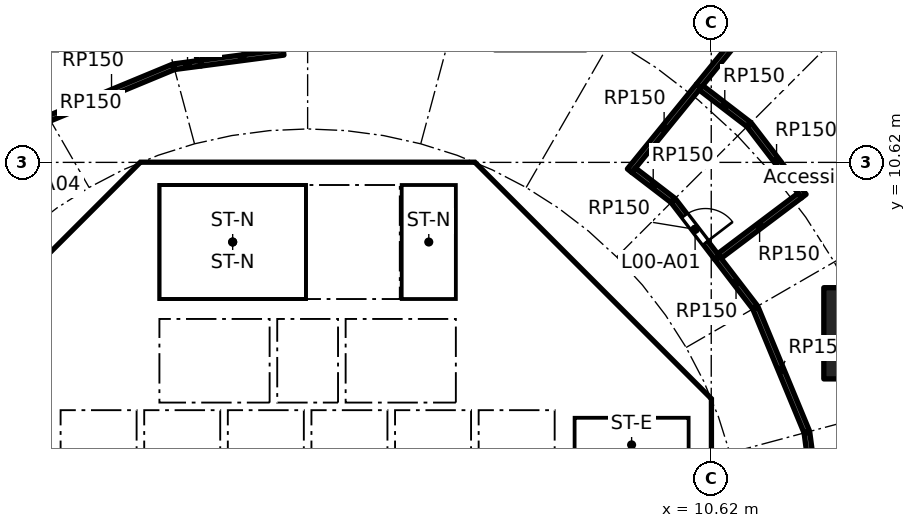
"""IFC4 building model, lengths in metres.
Left out: names, types, materials, properties, quantities, classifications, styles, units other than length and angle.
Written with IfcOpenShell. Run it as: python <this file> out.ifc"""

import sys

from ifc_helpers import new_model, si_unit, direction, frame, frame_2d, origin, origin_2d, place, context, subcontext, project, spatial, polyline, rectangle, outline, extrude, element, fill, save


model = new_model("IFC4")
c1 = context("Model", 3, precision=1e-05, world=origin(), true_north=direction((0.0, 1.0)))
c2 = subcontext(c1, "Body", "Model", "MODEL_VIEW")
j1 = project(units=[si_unit("LENGTHUNIT", "METRE"), si_unit("PLANEANGLEUNIT", "RADIAN")], contexts=[c1])
p1 = place(None, origin())
s1 = spatial("IfcSite", under=j1, at=p1, CompositionType="ELEMENT")
p2 = place(p1, origin())
s2 = spatial("IfcBuilding", under=s1, at=p2, CompositionType="ELEMENT")
p3 = place(p2, origin())
s3 = spatial("IfcBuildingStorey", under=s2, at=p3, CompositionType="ELEMENT", Elevation=0.0)
p4 = place(p3, frame((14.782, 6.123, 0.0), z_axis=(0.0, 0.0, 1.0), x_axis=(1.0, 0.0, 0.0)))
e1 = element("IfcColumn", 1, at=p4, inside=s3, PredefinedType="COLUMN", context=c2, shape_type="SweptSolid", body=[
    extrude(rectangle(XDim=2.4, YDim=2.4, at=origin_2d()), origin(), (0.0, 0.0, 1.0), 7.0),
])
p5 = place(p3, frame((10.325, -3.801, 0.0), z_axis=(0.0, 0.0, 1.0), x_axis=(0.0, 1.0, 0.0)))
e2 = element("IfcWall", 2, at=p5, inside=s3, PredefinedType="SHEAR", context=c2, shape_type="SweptSolid", body=[
    extrude(rectangle(XDim=7.602, YDim=0.6, at=frame_2d((3.801, 0.0))), origin(), (0.0, 0.0, 1.0), 6.7),
])
p6 = place(p5, frame((6.351, 0.0, 0.0)))
e3 = element("IfcOpeningElement", 3, at=p6, cuts=e2, PredefinedType="OPENING", context=c2, shape_type="SweptSolid", body=[
    extrude(rectangle(XDim=1.1, YDim=2.1, at=frame_2d((0.55, 1.05))), frame((0.0, 0.31, 0.0), z_axis=(0.0, -1.0, 0.0), x_axis=(1.0, 0.0, 0.0)), (0.0, 0.0, 1.0), 0.62),
])
p7 = place(p3, frame((9.988, 4.613, 0.0), z_axis=(0.0, 0.0, 1.0), x_axis=(-0.707106781187, 0.707106781187, 0.0)))
e4 = element("IfcWall", 4, at=p7, inside=s3, PredefinedType="SHEAR", context=c2, shape_type="SweptSolid", body=[
    extrude(rectangle(XDim=7.602, YDim=0.6, at=frame_2d((3.801, 0.0))), origin(), (0.0, 0.0, 1.0), 6.7),
])
p8 = place(p7, frame((3.201, 0.0, 0.0)))
e5 = element("IfcOpeningElement", 5, at=p8, cuts=e4, PredefinedType="OPENING", context=c2, shape_type="SweptSolid", body=[
    extrude(rectangle(XDim=1.2, YDim=2.1, at=frame_2d((0.6, 1.05))), frame((0.0, 0.31, 0.0), z_axis=(0.0, -1.0, 0.0), x_axis=(1.0, 0.0, 0.0)), (0.0, 0.0, 1.0), 0.62),
])
p9 = place(p3, frame((3.801, 10.325, 0.0), z_axis=(0.0, 0.0, 1.0), x_axis=(-1.0, 0.0, 0.0)))
e6 = element("IfcWall", 6, at=p9, inside=s3, PredefinedType="SHEAR", context=c2, shape_type="SweptSolid", body=[
    extrude(rectangle(XDim=7.602, YDim=0.6, at=frame_2d((3.801, 0.0))), origin(), (0.0, 0.0, 1.0), 6.7),
])
p10 = place(p9, frame((0.151, 0.0, 0.0)))
e7 = element("IfcOpeningElement", 7, at=p10, cuts=e6, PredefinedType="OPENING", context=c2, shape_type="SweptSolid", body=[
    extrude(rectangle(XDim=1.1, YDim=2.1, at=frame_2d((0.55, 1.05))), frame((0.0, 0.31, 0.0), z_axis=(0.0, -1.0, 0.0), x_axis=(1.0, 0.0, 0.0)), (0.0, 0.0, 1.0), 0.62),
])
p11 = place(p3, frame((-4.613, 9.988, 0.0), z_axis=(0.0, 0.0, 1.0), x_axis=(-0.707106781187, -0.707106781187, 0.0)))
e8 = element("IfcWall", 8, at=p11, inside=s3, PredefinedType="SHEAR", context=c2, shape_type="SweptSolid", body=[
    extrude(rectangle(XDim=7.602, YDim=0.6, at=frame_2d((3.801, 0.0))), origin(), (0.0, 0.0, 1.0), 6.7),
])
p12 = place(p11, frame((0.351, 0.0, 0.0)))
e9 = element("IfcOpeningElement", 9, at=p12, cuts=e8, PredefinedType="OPENING", context=c2, shape_type="SweptSolid", body=[
    extrude(rectangle(XDim=1.1, YDim=2.1, at=frame_2d((0.55, 1.05))), frame((0.0, 0.31, 0.0), z_axis=(0.0, -1.0, 0.0), x_axis=(1.0, 0.0, 0.0)), (0.0, 0.0, 1.0), 0.62),
])
p13 = place(p3, frame((-5.8, 4.3, 0.0), z_axis=(0.0, 0.0, 1.0), x_axis=(0.0, 1.0, 0.0)))
e10 = element("IfcWall", 10, at=p13, inside=s3, PredefinedType="PARTITIONING", context=c2, shape_type="SweptSolid", body=[
    extrude(rectangle(XDim=3.927, YDim=0.15, at=frame_2d((1.963, 0.0))), origin(), (0.0, 0.0, 1.0), 6.7),
])
p14 = place(p13, frame((1.551, 0.0, 0.0)))
e11 = element("IfcOpeningElement", 11, at=p14, cuts=e10, PredefinedType="OPENING", context=c2, shape_type="SweptSolid", body=[
    extrude(rectangle(XDim=0.9, YDim=2.1, at=frame_2d((0.45, 1.05))), frame((0.0, 0.085, 0.0), z_axis=(0.0, -1.0, 0.0), x_axis=(1.0, 0.0, 0.0)), (0.0, 0.0, 1.0), 0.17),
])
p15 = place(p3, frame((4.0, 4.3, 0.0), z_axis=(0.0, 0.0, 1.0), x_axis=(0.0, 1.0, 0.0)))
e12 = element("IfcWall", 12, at=p15, inside=s3, PredefinedType="SOLIDWALL", context=c2, shape_type="SweptSolid", body=[
    extrude(rectangle(XDim=2.2, YDim=0.2, at=frame_2d((1.1, 0.0))), origin(), (0.0, 0.0, 1.0), 6.7),
])
p16 = place(p15, frame((0.55, 0.0, 0.0)))
e13 = element("IfcOpeningElement", 13, at=p16, cuts=e12, PredefinedType="OPENING", context=c2, shape_type="SweptSolid", body=[
    extrude(rectangle(XDim=1.1, YDim=2.1, at=frame_2d((0.55, 1.05))), frame((0.0, 0.11, 0.0), z_axis=(0.0, -1.0, 0.0), x_axis=(1.0, 0.0, 0.0)), (0.0, 0.0, 1.0), 0.22),
])
p17 = place(p3, frame((-4.0, 4.3, 0.0), z_axis=(0.0, 0.0, 1.0), x_axis=(0.0, 1.0, 0.0)))
e14 = element("IfcWall", 14, at=p17, inside=s3, PredefinedType="SOLIDWALL", context=c2, shape_type="SweptSolid", body=[
    extrude(rectangle(XDim=2.2, YDim=0.2, at=frame_2d((1.1, 0.0))), origin(), (0.0, 0.0, 1.0), 6.7),
])
p18 = place(p17, frame((0.55, 0.0, 0.0)))
e15 = element("IfcOpeningElement", 15, at=p18, cuts=e14, PredefinedType="OPENING", context=c2, shape_type="SweptSolid", body=[
    extrude(rectangle(XDim=1.1, YDim=2.1, at=frame_2d((0.55, 1.05))), frame((0.0, 0.11, 0.0), z_axis=(0.0, -1.0, 0.0), x_axis=(1.0, 0.0, 0.0)), (0.0, 0.0, 1.0), 0.22),
])
p19 = place(p3, frame((6.7, 4.0, 0.0), z_axis=(0.0, 0.0, 1.0), x_axis=(1.0, 0.0, 0.0)))
e16 = element("IfcWall", 16, at=p19, inside=s3, PredefinedType="SOLIDWALL", context=c2, shape_type="SweptSolid", body=[
    extrude(rectangle(XDim=3.325, YDim=0.2, at=frame_2d((1.662, 0.0))), origin(), (0.0, 0.0, 1.0), 6.7),
])
p20 = place(p19, frame((1.25, 0.0, 0.0)))
e17 = element("IfcOpeningElement", 17, at=p20, cuts=e16, PredefinedType="OPENING", context=c2, shape_type="SweptSolid", body=[
    extrude(rectangle(XDim=1.1, YDim=2.1, at=frame_2d((0.55, 1.05))), frame((0.0, 0.11, 0.0), z_axis=(0.0, -1.0, 0.0), x_axis=(1.0, 0.0, 0.0)), (0.0, 0.0, 1.0), 0.22),
])
p21 = place(p3, frame((4.0, 7.025, 0.0), z_axis=(0.0, 0.0, 1.0), x_axis=(0.0, 1.0, 0.0)))
e18 = element("IfcWall", 18, at=p21, inside=s3, PredefinedType="SOLIDWALL", context=c2, shape_type="SweptSolid", body=[
    extrude(rectangle(XDim=3.0, YDim=0.2, at=frame_2d((1.5, 0.0))), origin(), (0.0, 0.0, 1.0), 6.7),
])
p22 = place(p21, frame((0.925, 0.0, 0.0)))
e19 = element("IfcOpeningElement", 19, at=p22, cuts=e18, PredefinedType="OPENING", context=c2, shape_type="SweptSolid", body=[
    extrude(rectangle(XDim=1.1, YDim=2.1, at=frame_2d((0.55, 1.05))), frame((0.0, 0.11, 0.0), z_axis=(0.0, -1.0, 0.0), x_axis=(1.0, 0.0, 0.0)), (0.0, 0.0, 1.0), 0.22),
])
p23 = place(p3, origin())
e20 = element("IfcWall", 20, at=p23, inside=s3, PredefinedType="SHEAR", context=c2, shape_type="SweptSolid", body=[
    extrude(outline(polyline([(-3.801, 10.625), (-3.801, 10.025), (-4.152, 10.025), (-4.401, 9.776), (-4.825, 10.2), (-4.401, 10.625), (-3.801, 10.625)])), origin(), (0.0, 0.0, 1.0), 6.7),
])
p24 = place(p3, origin())
e21 = element("IfcWall", 21, at=p24, inside=s3, PredefinedType="SHEAR", context=c2, shape_type="SweptSolid", body=[
    extrude(outline(polyline([(4.825, 10.2), (4.401, 9.776), (4.152, 10.025), (3.801, 10.025), (3.801, 10.625), (4.401, 10.625), (4.825, 10.2)])), origin(), (0.0, 0.0, 1.0), 6.7),
])
p25 = place(p3, origin())
e22 = element("IfcWall", 22, at=p25, inside=s3, PredefinedType="SHEAR", context=c2, shape_type="SweptSolid", body=[
    extrude(outline(polyline([(10.625, 3.801), (10.025, 3.801), (10.025, 4.152), (9.776, 4.401), (10.2, 4.825), (10.625, 4.401), (10.625, 3.801)])), origin(), (0.0, 0.0, 1.0), 6.7),
])
for number, where, z_axis, x_axis in (
    (23, (-0.9, 4.3, 0.0), (0.0, 0.0, 1.0), (0.0, 1.0, 0.0)),
    (24, (0.9, 4.3, 0.0), (0.0, 0.0, 1.0), (0.0, 1.0, 0.0)),
):
    element("IfcWall", number, at=place(p3, frame(where, z_axis=z_axis, x_axis=x_axis)), inside=s3, PredefinedType="SOLIDWALL", context=c2, shape_type="SweptSolid", body=[
        extrude(rectangle(XDim=2.2, YDim=0.2, at=frame_2d((1.1, 0.0))), origin(), (0.0, 0.0, 1.0), 6.7),
    ])
p26 = place(p3, origin())
e25 = element("IfcWall", 25, at=p26, inside=s3, PredefinedType="SOLIDWALL", context=c2, shape_type="SweptSolid", body=[
    extrude(outline(polyline([(-6.5, 2.1), (-6.7, 2.1), (-6.7, 4.3), (6.7, 4.3), (6.7, 2.1), (6.5, 2.1), (6.5, 4.1), (4.5, 4.1), (4.5, 2.1), (4.3, 2.1), (4.3, 4.1), (2.3, 4.1), (2.3, 2.1), (2.1, 2.1), (2.1, 4.1), (0.1, 4.1), (0.1, 2.1), (-0.1, 2.1), (-0.1, 4.1), (-2.1, 4.1), (-2.1, 2.1), (-2.3, 2.1), (-2.3, 4.1), (-4.3, 4.1), (-4.3, 2.1), (-4.5, 2.1), (-4.5, 4.1), (-6.5, 4.1), (-6.5, 2.1)])), origin(), (0.0, 0.0, 1.0), 6.7),
])
p27 = place(p3, frame((-10.025, 4.0, 0.0), z_axis=(0.0, 0.0, 1.0), x_axis=(1.0, 0.0, 0.0)))
e26 = element("IfcWall", 26, at=p27, inside=s3, PredefinedType="PARTITIONING", context=c2, shape_type="SweptSolid", body=[
    extrude(rectangle(XDim=3.325, YDim=0.2, at=frame_2d((1.662, 0.0))), origin(), (0.0, 0.0, 1.0), 6.7),
])
p28 = place(p3, origin())
e27 = element("IfcWall", 27, at=p28, inside=s3, PredefinedType="SOLIDWALL", context=c2, shape_type="SweptSolid", body=[
    extrude(outline(polyline([(-3.9, 7.025), (-4.1, 7.025), (-4.1, 10.025), (-3.9, 10.025), (-3.9, 7.025)])), origin(), (0.0, 0.0, 1.0), 6.7),
])
p29 = place(p3, origin())
e28 = element("IfcWall", 28, at=p29, inside=s3, PredefinedType="SOLIDWALL", context=c2, shape_type="SweptSolid", body=[
    extrude(outline(polyline([(4.1, 6.5), (-4.1, 6.5), (-4.1, 7.025), (4.1, 7.025), (4.1, 6.5)])), origin(), (0.0, 0.0, 1.0), 6.7),
])
p30 = place(p3, origin())
e29 = element("IfcWall", 29, at=p30, inside=s3, PredefinedType="SOLIDWALL", context=c2, shape_type="SweptSolid", body=[
    extrude(outline(polyline([(7.025, -3.9), (6.7, -3.9), (6.7, 3.9), (7.025, 3.9), (7.025, -3.9)])), origin(), (0.0, 0.0, 1.0), 6.7),
])
p31 = place(p3, frame((-6.789, 11.782, 0.0), z_axis=(0.0, 0.0, 1.0), x_axis=(0.923881838111, 0.382677866108, 0.0)))
e30 = element("IfcWall", 30, at=p31, inside=s3, PredefinedType="PARTITIONING", context=c2, shape_type="SweptSolid", body=[
    extrude(rectangle(XDim=3.527, YDim=0.15, at=frame_2d((1.763, 0.0))), origin(), (0.0, 0.0, 1.0), 6.7),
])
p32 = place(p3, frame((-3.508, 13.138, 0.0), z_axis=(0.0, 0.0, 1.0), x_axis=(0.991460212813, 0.130409533429, 0.0)))
e31 = element("IfcWall", 31, at=p32, inside=s3, PredefinedType="PARTITIONING", context=c2, shape_type="SweptSolid", body=[
    extrude(rectangle(XDim=0.702, YDim=0.15, at=frame_2d((0.351, 0.0))), origin(), (0.0, 0.0, 1.0), 6.7),
])
p33 = place(p3, frame((-2.828, 13.303, 0.0), z_axis=(0.0, 0.0, 1.0), x_axis=(-0.207924325278, 0.978144915111, 0.0)))
e32 = element("IfcWall", 32, at=p33, inside=s3, PredefinedType="PARTITIONING", context=c2, shape_type="SweptSolid", body=[
    extrude(rectangle(XDim=16.699, YDim=0.15, at=frame_2d((8.35, 0.0))), origin(), (0.0, 0.0, 1.0), 6.7),
])
p34 = place(p3, frame((-2.812, 13.23, 0.0), z_axis=(0.0, 0.0, 1.0), x_axis=(0.991442947496, 0.130540728744, 0.0)))
e33 = element("IfcWall", 33, at=p34, inside=s3, PredefinedType="PARTITIONING", context=c2, shape_type="SweptSolid", body=[
    extrude(rectangle(XDim=2.198, YDim=0.15, at=frame_2d((1.099, 0.0))), origin(), (0.0, 0.0, 1.0), 6.7),
])
p35 = place(p3, frame((8.472, 10.401, 0.0), z_axis=(0.0, 0.0, 1.0), x_axis=(0.631544460315, 0.775339664048, 0.0)))
e34 = element("IfcWall", 34, at=p35, inside=s3, PredefinedType="PARTITIONING", context=c2, shape_type="SweptSolid", body=[
    extrude(rectangle(XDim=2.876, YDim=0.15, at=frame_2d((1.438, 0.0))), origin(), (0.0, 0.0, 1.0), 6.7),
])
p36 = place(p3, frame((9.607, 9.624, 0.0), z_axis=(0.0, 0.0, 1.0), x_axis=(-0.793421424222, 0.608672690028, 0.0)))
e35 = element("IfcWall", 35, at=p36, inside=s3, PredefinedType="PARTITIONING", context=c2, shape_type="SweptSolid", body=[
    extrude(rectangle(XDim=1.296, YDim=0.15, at=frame_2d((0.648, 0.0))), origin(), (0.0, 0.0, 1.0), 6.7),
])
p37 = place(p3, frame((10.348, 12.585, 0.0), z_axis=(0.0, 0.0, 1.0), x_axis=(0.793328373205, -0.608793965368, 0.0)))
e36 = element("IfcWall", 36, at=p37, inside=s3, PredefinedType="PARTITIONING", context=c2, shape_type="SweptSolid", body=[
    extrude(rectangle(XDim=1.584, YDim=0.15, at=frame_2d((0.792, 0.0))), origin(), (0.0, 0.0, 1.0), 6.7),
])
p38 = place(p3, frame((10.288, 12.631, 0.0), z_axis=(0.0, 0.0, 1.0), x_axis=(0.631545274273, 0.775339001046, 0.0)))
e37 = element("IfcWall", 37, at=p38, inside=s3, PredefinedType="PARTITIONING", context=c2, shape_type="SweptSolid", body=[
    extrude(rectangle(XDim=16.345, YDim=0.15, at=frame_2d((8.173, 0.0))), origin(), (0.0, 0.0, 1.0), 6.7),
])
p39 = place(p3, frame((10.774, 8.109, 0.0), z_axis=(0.0, 0.0, 1.0), x_axis=(-0.608754453805, 0.793358692504, 0.0)))
e38 = element("IfcWall", 38, at=p39, inside=s3, PredefinedType="PARTITIONING", context=c2, shape_type="SweptSolid", body=[
    extrude(rectangle(XDim=1.888, YDim=0.15, at=frame_2d((0.944, 0.0))), origin(), (0.0, 0.0, 1.0), 6.7),
])
p40 = place(p39, frame((0.5, 0.0, 0.0)))
e39 = element("IfcOpeningElement", 39, at=p40, cuts=e38, PredefinedType="OPENING", context=c2, shape_type="SweptSolid", body=[
    extrude(rectangle(XDim=0.9, YDim=2.1, at=frame_2d((0.45, 1.05))), frame((0.0, 0.085, 0.0), z_axis=(0.0, -1.0, 0.0), x_axis=(1.0, 0.0, 0.0)), (0.0, 0.0, 1.0), 0.17),
])
p41 = place(p3, frame((11.621, 11.604, 0.0), z_axis=(0.0, 0.0, 1.0), x_axis=(0.608759688573, -0.793354675771, 0.0)))
e40 = element("IfcWall", 40, at=p41, inside=s3, PredefinedType="PARTITIONING", context=c2, shape_type="SweptSolid", body=[
    extrude(rectangle(XDim=2.358, YDim=0.15, at=frame_2d((1.179, 0.0))), origin(), (0.0, 0.0, 1.0), 6.7),
])
p42 = place(p3, frame((11.771, 6.809, 0.0), z_axis=(0.0, 0.0, 1.0), x_axis=(-0.608716251771, 0.793388003961, 0.0)))
e41 = element("IfcWall", 41, at=p42, inside=s3, PredefinedType="PARTITIONING", context=c2, shape_type="SweptSolid", body=[
    extrude(rectangle(XDim=1.638, YDim=0.15, at=frame_2d((0.819, 0.0))), origin(), (0.0, 0.0, 1.0), 6.7),
])
p43 = place(p3, frame((12.951, 9.748, 0.0), z_axis=(0.0, 0.0, 1.0), x_axis=(-0.798970748419, -0.601369888813, 0.0)))
e42 = element("IfcWall", 42, at=p43, inside=s3, PredefinedType="PARTITIONING", context=c2, shape_type="SweptSolid", body=[
    extrude(rectangle(XDim=2.65, YDim=0.15, at=frame_2d((1.325, 0.0))), origin(), (0.0, 0.0, 1.0), 6.7),
])
p44 = place(p3, frame((13.132, 3.531, 0.0), z_axis=(0.0, 0.0, 1.0), x_axis=(-0.382677866108, 0.923881838111, 0.0)))
e43 = element("IfcWall", 43, at=p44, inside=s3, PredefinedType="PARTITIONING", context=c2, shape_type="SweptSolid", body=[
    extrude(rectangle(XDim=3.527, YDim=0.15, at=frame_2d((1.763, 0.0))), origin(), (0.0, 0.0, 1.0), 6.7),
])
p45 = place(p3, frame((13.376, 1.7, 0.0), z_axis=(0.0, 0.0, 1.0), x_axis=(-0.130506449818, 0.99144746031, 0.0)))
e44 = element("IfcWall", 44, at=p45, inside=s3, PredefinedType="PARTITIONING", context=c2, shape_type="SweptSolid", body=[
    extrude(rectangle(XDim=1.824, YDim=0.15, at=frame_2d((0.912, 0.0))), origin(), (0.0, 0.0, 1.0), 6.7),
])
p46 = place(p3, frame((31.284, 4.152, 0.0), z_axis=(0.0, 0.0, 1.0), x_axis=(-0.991305556345, -0.131579990725, 0.0)))
e45 = element("IfcWall", 45, at=p46, inside=s3, PredefinedType="PARTITIONING", context=c2, shape_type="SweptSolid", body=[
    extrude(rectangle(XDim=18.0, YDim=0.15, at=frame_2d((9.0, 0.0))), origin(), (0.0, 0.0, 1.0), 6.7),
])
p47 = place(p46, frame((8.625, 0.0, 0.0)))
e46 = element("IfcOpeningElement", 46, at=p47, cuts=e45, PredefinedType="OPENING", context=c2, shape_type="SweptSolid", body=[
    extrude(rectangle(XDim=0.9, YDim=2.1, at=frame_2d((0.45, 1.05))), frame((0.0, 0.085, 0.0), z_axis=(0.0, -1.0, 0.0), x_axis=(1.0, 0.0, 0.0)), (0.0, 0.0, 1.0), 0.17),
])
p48 = place(p16, origin())
e47 = element("IfcDoor", 47, at=p48, inside=s3, OperationType="DOUBLE_DOOR_SLIDING", PredefinedType="DOOR", context=c2, shape_type="SweptSolid", body=[
    extrude(rectangle(XDim=1.1, YDim=2.1, at=frame_2d((0.55, 1.05))), frame((0.0, 0.025, 0.0), z_axis=(0.0, -1.0, 0.0), x_axis=(1.0, 0.0, 0.0)), (0.0, 0.0, 1.0), 0.05),
])
fill(e13, e47)
p49 = place(p18, origin())
e48 = element("IfcDoor", 48, at=p49, inside=s3, OperationType="DOUBLE_DOOR_SLIDING", PredefinedType="DOOR", context=c2, shape_type="SweptSolid", body=[
    extrude(rectangle(XDim=1.1, YDim=2.1, at=frame_2d((0.55, 1.05))), frame((0.0, 0.025, 0.0), z_axis=(0.0, -1.0, 0.0), x_axis=(1.0, 0.0, 0.0)), (0.0, 0.0, 1.0), 0.05),
])
fill(e15, e48)
p50 = place(p20, frame((1.1, 0.0, 0.0), x_axis=(-1.0, 0.0, 0.0)))
e49 = element("IfcDoor", 49, at=p50, inside=s3, OperationType="SINGLE_SWING_RIGHT", PredefinedType="DOOR", context=c2, shape_type="SweptSolid", body=[
    extrude(rectangle(XDim=1.1, YDim=2.1, at=frame_2d((0.55, 1.05))), frame((0.0, 0.025, 0.0), z_axis=(0.0, -1.0, 0.0), x_axis=(1.0, 0.0, 0.0)), (0.0, 0.0, 1.0), 0.05),
])
fill(e17, e49)
p51 = place(p22, origin())
e50 = element("IfcDoor", 50, at=p51, inside=s3, OperationType="SINGLE_SWING_LEFT", PredefinedType="DOOR", context=c2, shape_type="SweptSolid", body=[
    extrude(rectangle(XDim=1.1, YDim=2.1, at=frame_2d((0.55, 1.05))), frame((0.0, 0.025, 0.0), z_axis=(0.0, -1.0, 0.0), x_axis=(1.0, 0.0, 0.0)), (0.0, 0.0, 1.0), 0.05),
])
fill(e19, e50)
p52 = place(p14, origin())
e51 = element("IfcDoor", 51, at=p52, inside=s3, OperationType="SINGLE_SWING_RIGHT", PredefinedType="DOOR", context=c2, shape_type="SweptSolid", body=[
    extrude(rectangle(XDim=0.9, YDim=2.1, at=frame_2d((0.45, 1.05))), frame((0.0, 0.025, 0.0), z_axis=(0.0, -1.0, 0.0), x_axis=(1.0, 0.0, 0.0)), (0.0, 0.0, 1.0), 0.05),
])
fill(e11, e51)
p53 = place(p8, origin())
e52 = element("IfcDoor", 52, at=p53, inside=s3, OperationType="SINGLE_SWING_LEFT", PredefinedType="DOOR", context=c2, shape_type="SweptSolid", body=[
    extrude(rectangle(XDim=1.2, YDim=2.1, at=frame_2d((0.6, 1.05))), frame((0.0, 0.025, 0.0), z_axis=(0.0, -1.0, 0.0), x_axis=(1.0, 0.0, 0.0)), (0.0, 0.0, 1.0), 0.05),
])
fill(e5, e52)
p54 = place(p12, origin())
e53 = element("IfcDoor", 53, at=p54, inside=s3, OperationType="SINGLE_SWING_LEFT", PredefinedType="DOOR", context=c2, shape_type="SweptSolid", body=[
    extrude(rectangle(XDim=1.1, YDim=2.1, at=frame_2d((0.55, 1.05))), frame((0.0, 0.025, 0.0), z_axis=(0.0, -1.0, 0.0), x_axis=(1.0, 0.0, 0.0)), (0.0, 0.0, 1.0), 0.05),
])
fill(e9, e53)
p55 = place(p6, frame((1.1, 0.0, 0.0), x_axis=(-1.0, 0.0, 0.0)))
e54 = element("IfcDoor", 54, at=p55, inside=s3, OperationType="SINGLE_SWING_LEFT", PredefinedType="DOOR", context=c2, shape_type="SweptSolid", body=[
    extrude(rectangle(XDim=1.1, YDim=2.1, at=frame_2d((0.55, 1.05))), frame((0.0, 0.025, 0.0), z_axis=(0.0, -1.0, 0.0), x_axis=(1.0, 0.0, 0.0)), (0.0, 0.0, 1.0), 0.05),
])
fill(e3, e54)
p56 = place(p10, frame((1.1, 0.0, 0.0), x_axis=(-1.0, 0.0, 0.0)))
e55 = element("IfcDoor", 55, at=p56, inside=s3, OperationType="SINGLE_SWING_LEFT", PredefinedType="DOOR", context=c2, shape_type="SweptSolid", body=[
    extrude(rectangle(XDim=1.1, YDim=2.1, at=frame_2d((0.55, 1.05))), frame((0.0, 0.025, 0.0), z_axis=(0.0, -1.0, 0.0), x_axis=(1.0, 0.0, 0.0)), (0.0, 0.0, 1.0), 0.05),
])
fill(e7, e55)
p57 = place(p40, frame((0.9, 0.0, 0.0), x_axis=(-1.0, 0.0, 0.0)))
e56 = element("IfcDoor", 56, at=p57, inside=s3, OperationType="SINGLE_SWING_RIGHT", PredefinedType="DOOR", context=c2, shape_type="SweptSolid", body=[
    extrude(rectangle(XDim=0.9, YDim=2.1, at=frame_2d((0.45, 1.05))), frame((0.0, 0.025, 0.0), z_axis=(0.0, -1.0, 0.0), x_axis=(1.0, 0.0, 0.0)), (0.0, 0.0, 1.0), 0.05),
])
fill(e39, e56)
save(model, sys.argv[1])
